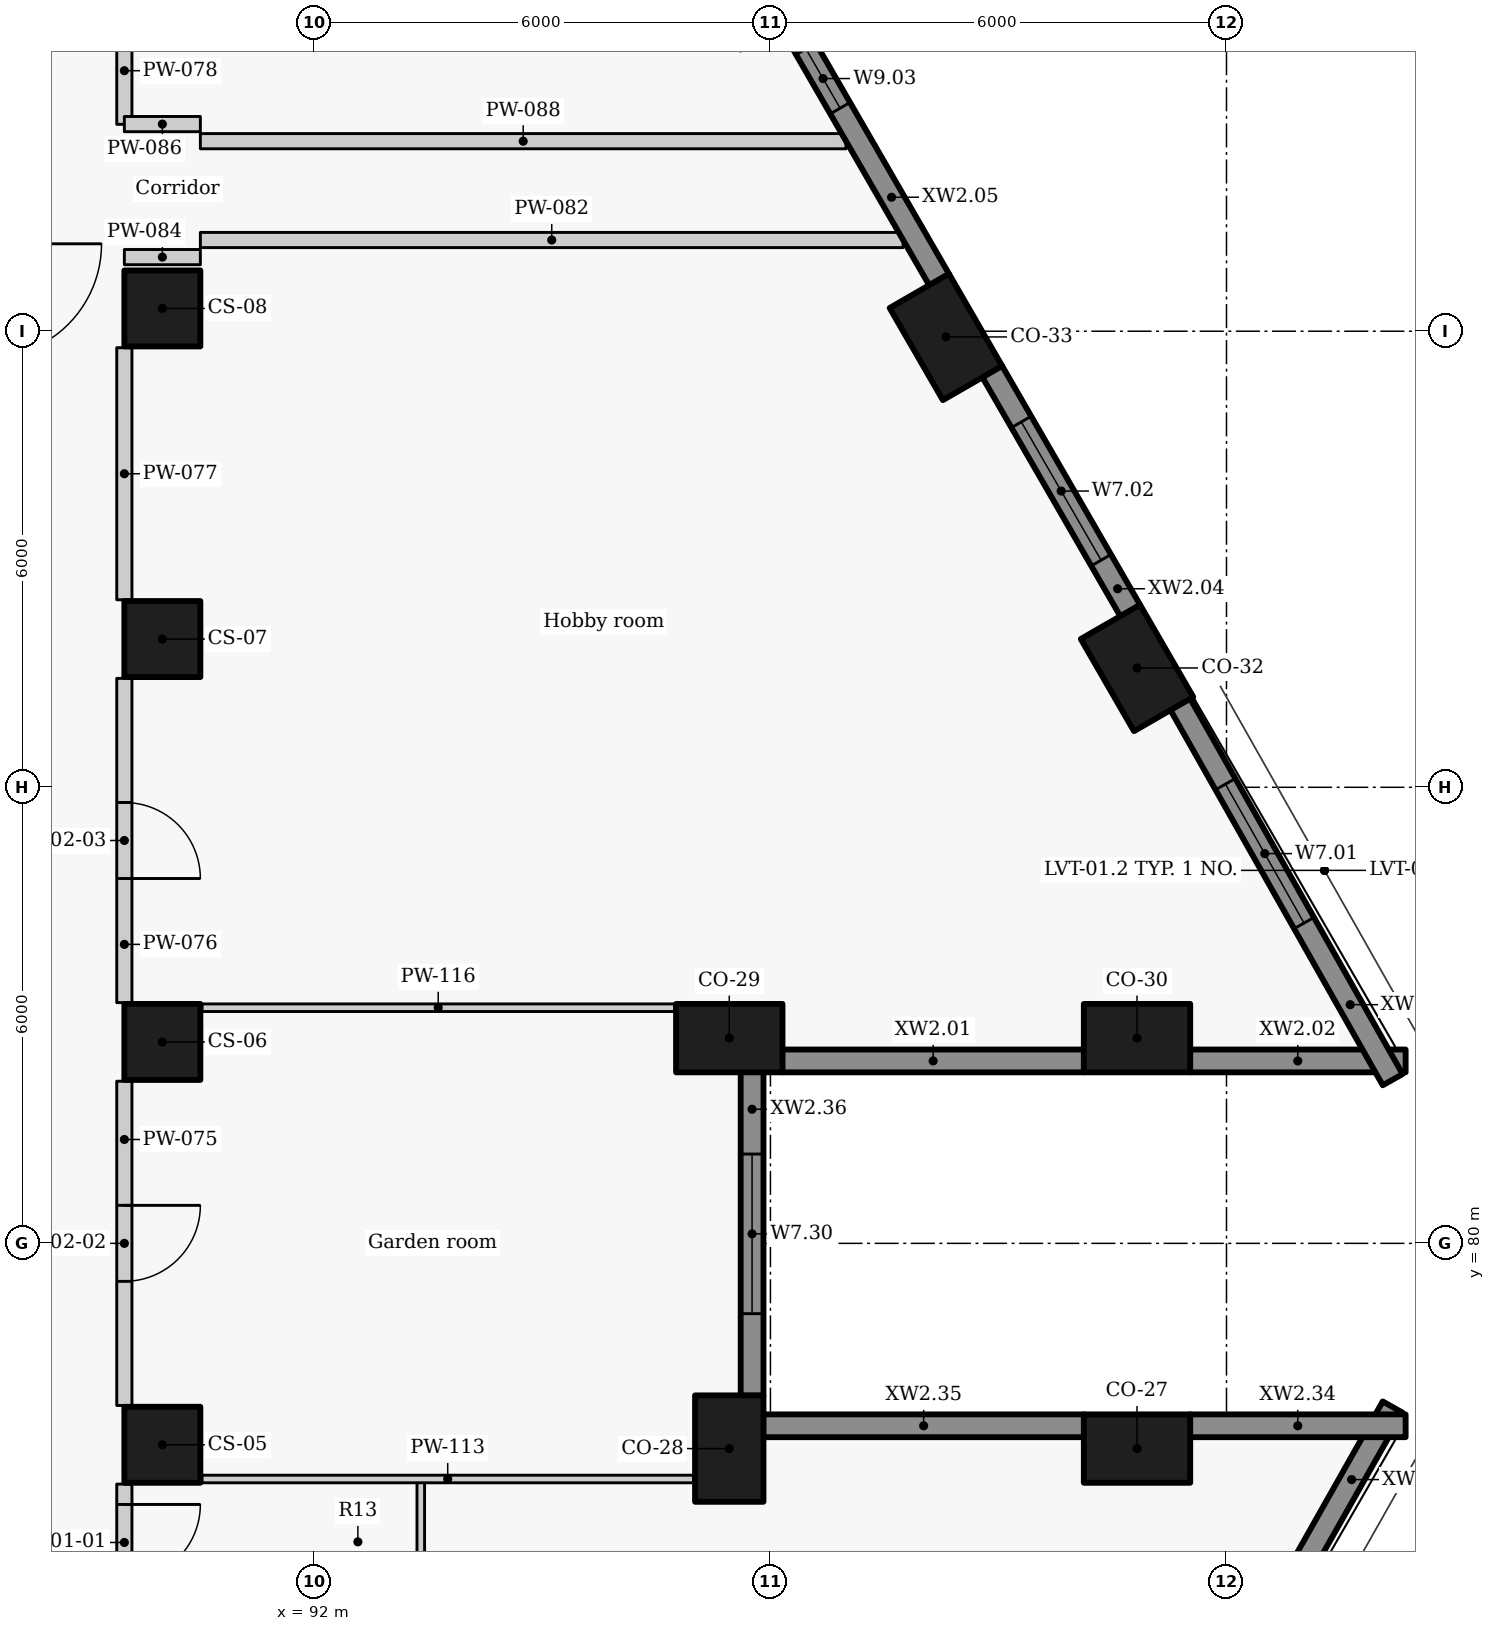
"""IFC4 building model, lengths in metres.
Left out: names, types, materials, properties, quantities, classifications, styles, units other than length and angle.
Written with IfcOpenShell. Run it as: python <this file> out.ifc"""

import sys

from ifc_helpers import new_model, si_unit, direction, frame, frame_2d, origin, origin_2d, place, context, subcontext, project, spatial, rectangle, extrude, element, fill, save


model = new_model("IFC4")
c1 = context("Model", 3, precision=1e-05, world=origin(), true_north=direction((0.0, 1.0)))
c2 = subcontext(c1, "Body", "Model", "MODEL_VIEW")
j1 = project(units=[si_unit("LENGTHUNIT", "METRE"), si_unit("PLANEANGLEUNIT", "RADIAN")], contexts=[c1])
p1 = place(None, origin())
s1 = spatial("IfcSite", under=j1, at=p1, CompositionType="ELEMENT")
p2 = place(p1, origin())
s2 = spatial("IfcBuilding", under=s1, at=p2, CompositionType="ELEMENT")
p3 = place(p2, frame((0.0, 0.0, 107.4)))
s3 = spatial("IfcBuildingStorey", under=s2, at=p3, CompositionType="ELEMENT", Elevation=107.4)
for number, where, z_axis, x_axis in (
    (1, (102.823, 77.3, 0.0), (0.0, 0.0, 1.0), (-1.0, 0.0, 0.0)),
    (2, (97.458, 77.3, 0.0), (0.0, 0.0, 1.0), (0.0, 1.0, 0.0)),
    (3, (97.458, 82.7, 0.0), (0.0, 0.0, 1.0), (1.0, 0.0, 0.0)),
    (4, (102.823, 82.7, 0.0), (0.0, 0.0, 1.0), (1.0, 0.0, 0.0)),
    (5, (102.823, 87.57, 0.0), (0.0, 0.0, 1.0), (-0.5, 0.866, 0.0)),
    (6, (100.308, 91.925, 0.0), (0.0, 0.0, 1.0), (-0.5, 0.866, 0.0)),
):
    element("IfcColumn", number, at=place(p3, frame(where, z_axis=z_axis, x_axis=x_axis)), inside=s3, PredefinedType="COLUMN", context=c2, shape_type="SweptSolid", body=[
        extrude(rectangle(XDim=1.4, YDim=0.9, at=origin_2d()), origin(), (0.0, 0.0, 1.0), 3.3),
    ])
for number, where, z_axis, x_axis in (
    (7, (90.0, 77.35, 0.0), (0.0, 0.0, 1.0), (0.0, 1.0, 0.0)),
    (8, (90.0, 82.65, 0.0), (0.0, 0.0, 1.0), (0.0, 1.0, 0.0)),
    (9, (90.0, 87.95, 0.0), (0.0, 0.0, 1.0), (0.0, 1.0, 0.0)),
    (10, (90.0, 92.3, 0.0), (0.0, 0.0, 1.0), (0.0, 1.0, 0.0)),
):
    element("IfcColumn", number, at=place(p3, frame(where, z_axis=z_axis, x_axis=x_axis)), inside=s3, PredefinedType="COLUMN", context=c2, shape_type="SweptSolid", body=[
        extrude(rectangle(XDim=1.0, YDim=1.0, at=origin_2d()), origin(), (0.0, 0.0, 1.0), 3.3),
    ])
p4 = place(p3, frame((98.154, 82.4, 0.0), z_axis=(0.0, 0.0, 1.0), x_axis=(1.0, 0.0, 0.0)))
e11 = element("IfcWall", 11, at=p4, inside=s3, PredefinedType="SOLIDWALL", context=c2, shape_type="SweptSolid", body=[
    extrude(rectangle(XDim=3.973, YDim=0.3, at=frame_2d((1.986, 0.0))), origin(), (0.0, 0.0, 1.0), 2.425),
])
p5 = place(p3, frame((103.519, 82.4, 0.0), z_axis=(0.0, 0.0, 1.0), x_axis=(1.0, 0.0, 0.0)))
e12 = element("IfcWall", 12, at=p5, inside=s3, PredefinedType="SOLIDWALL", context=c2, shape_type="SweptSolid", body=[
    extrude(rectangle(XDim=2.838, YDim=0.3, at=frame_2d((1.419, 0.0))), origin(), (0.0, 0.0, 1.0), 2.425),
])
p6 = place(p3, frame((106.186, 82.153, 0.0), z_axis=(0.0, 0.0, 1.0), x_axis=(-0.492456858874, 0.870336855561, 0.0)))
e13 = element("IfcWall", 13, at=p6, inside=s3, PredefinedType="SOLIDWALL", context=c2, shape_type="SweptSolid", body=[
    extrude(rectangle(XDim=5.677, YDim=0.3, at=frame_2d((2.838, 0.0))), origin(), (0.0, 0.0, 1.0), 2.425),
])
p7 = place(p6, frame((2.367, 0.0, 0.9)))
e14 = element("IfcOpeningElement", 14, at=p7, cuts=e13, PredefinedType="OPENING", context=c2, shape_type="SweptSolid", body=[
    extrude(rectangle(XDim=2.1, YDim=1.1, at=frame_2d((1.05, 0.55))), frame((0.0, 0.16, 0.0), z_axis=(0.0, -1.0, 0.0), x_axis=(1.0, 0.0, 0.0)), (0.0, 0.0, 1.0), 0.32),
])
p8 = place(p3, frame((102.735, 88.323, 0.0), z_axis=(0.0, 0.0, 1.0), x_axis=(-0.500009139881, 0.866020126807, 0.0)))
e15 = element("IfcWall", 15, at=p8, inside=s3, PredefinedType="SOLIDWALL", context=c2, shape_type="SweptSolid", body=[
    extrude(rectangle(XDim=3.637, YDim=0.3, at=frame_2d((1.818, 0.0))), origin(), (0.0, 0.0, 1.0), 2.425),
])
p9 = place(p8, frame((0.768, 0.0, 0.9)))
e16 = element("IfcOpeningElement", 16, at=p9, cuts=e15, PredefinedType="OPENING", context=c2, shape_type="SweptSolid", body=[
    extrude(rectangle(XDim=2.1, YDim=1.1, at=frame_2d((1.05, 0.55))), frame((0.0, 0.16, 0.0), z_axis=(0.0, -1.0, 0.0), x_axis=(1.0, 0.0, 0.0)), (0.0, 0.0, 1.0), 0.32),
])
p10 = place(p3, frame((100.22, 92.677, 0.0), z_axis=(0.0, 0.0, 1.0), x_axis=(-0.499957037901, 0.866050206543, 0.0)))
e17 = element("IfcWall", 17, at=p10, inside=s3, PredefinedType="SOLIDWALL", context=c2, shape_type="SweptSolid", body=[
    extrude(rectangle(XDim=3.934, YDim=0.3, at=frame_2d((1.967, 0.0))), origin(), (0.0, 0.0, 1.0), 2.425),
])
p11 = place(p10, frame((2.606, 0.0, 0.9)))
e18 = element("IfcOpeningElement", 18, at=p11, cuts=e17, PredefinedType="OPENING", context=c2, shape_type="SweptSolid", body=[
    extrude(rectangle(XDim=0.9, YDim=1.1, at=frame_2d((0.45, 0.55))), frame((0.0, 0.16, 0.0), z_axis=(0.0, -1.0, 0.0), x_axis=(1.0, 0.0, 0.0)), (0.0, 0.0, 1.0), 0.32),
])
p12 = place(p3, frame((103.391, 72.906, 0.0), z_axis=(0.0, 0.0, 1.0), x_axis=(0.492456858874, 0.870336855561, 0.0)))
e19 = element("IfcWall", 19, at=p12, inside=s3, PredefinedType="SOLIDWALL", context=c2, shape_type="SweptSolid", body=[
    extrude(rectangle(XDim=5.677, YDim=0.3, at=frame_2d((2.838, 0.0))), origin(), (0.0, 0.0, 1.0), 2.425),
])
p13 = place(p12, frame((1.883, 0.0, 0.9)))
e20 = element("IfcOpeningElement", 20, at=p13, cuts=e19, PredefinedType="OPENING", context=c2, shape_type="SweptSolid", body=[
    extrude(rectangle(XDim=1.5, YDim=1.1, at=frame_2d((0.75, 0.55))), frame((0.0, 0.16, 0.0), z_axis=(0.0, -1.0, 0.0), x_axis=(1.0, 0.0, 0.0)), (0.0, 0.0, 1.0), 0.32),
])
p14 = place(p3, frame((106.357, 77.6, 0.0), z_axis=(0.0, 0.0, 1.0), x_axis=(-1.0, 0.0, 0.0)))
e21 = element("IfcWall", 21, at=p14, inside=s3, PredefinedType="SOLIDWALL", context=c2, shape_type="SweptSolid", body=[
    extrude(rectangle(XDim=2.838, YDim=0.3, at=frame_2d((1.419, 0.0))), origin(), (0.0, 0.0, 1.0), 2.425),
])
p15 = place(p3, frame((102.127, 77.6, 0.0), z_axis=(0.0, 0.0, 1.0), x_axis=(-1.0, 0.0, 0.0)))
e22 = element("IfcWall", 22, at=p15, inside=s3, PredefinedType="SOLIDWALL", context=c2, shape_type="SweptSolid", body=[
    extrude(rectangle(XDim=4.223, YDim=0.3, at=frame_2d((2.111, 0.0))), origin(), (0.0, 0.0, 1.0), 2.425),
])
p16 = place(p3, frame((97.758, 77.996, 0.0), z_axis=(0.0, 0.0, 1.0), x_axis=(0.0, 1.0, 0.0)))
e23 = element("IfcWall", 23, at=p16, inside=s3, PredefinedType="SOLIDWALL", context=c2, shape_type="SweptSolid", body=[
    extrude(rectangle(XDim=4.258, YDim=0.3, at=frame_2d((2.129, 0.0))), origin(), (0.0, 0.0, 1.0), 2.425),
])
p17 = place(p16, frame((1.079, 0.0, 0.9)))
e24 = element("IfcOpeningElement", 24, at=p17, cuts=e23, PredefinedType="OPENING", context=c2, shape_type="SweptSolid", body=[
    extrude(rectangle(XDim=2.1, YDim=1.1, at=frame_2d((1.05, 0.55))), frame((0.0, 0.16, 0.0), z_axis=(0.0, -1.0, 0.0), x_axis=(1.0, 0.0, 0.0)), (0.0, 0.0, 1.0), 0.32),
])
p18 = place(p3, frame((89.5, 76.833, 0.0), z_axis=(0.0, 0.0, 1.0), x_axis=(0.0, -1.0, 0.0)))
e25 = element("IfcWall", 25, at=p18, inside=s3, PredefinedType="PARTITIONING", context=c2, shape_type="SweptSolid", body=[
    extrude(rectangle(XDim=4.266, YDim=0.2, at=frame_2d((2.133, 0.0))), origin(), (0.0, 0.0, 1.0), 3.025),
])
p19 = place(p18, frame((0.268, 0.0, 0.0)))
e26 = element("IfcOpeningElement", 26, at=p19, cuts=e25, PredefinedType="OPENING", context=c2, shape_type="SweptSolid", body=[
    extrude(rectangle(XDim=1.0, YDim=2.1, at=frame_2d((0.5, 1.05))), frame((0.0, 0.11, 0.0), z_axis=(0.0, -1.0, 0.0), x_axis=(1.0, 0.0, 0.0)), (0.0, 0.0, 1.0), 0.22),
])
p20 = place(p3, frame((89.5, 82.133, 0.0), z_axis=(0.0, 0.0, 1.0), x_axis=(0.0, -1.0, 0.0)))
e27 = element("IfcWall", 27, at=p20, inside=s3, PredefinedType="PARTITIONING", context=c2, shape_type="SweptSolid", body=[
    extrude(rectangle(XDim=4.266, YDim=0.2, at=frame_2d((2.133, 0.0))), origin(), (0.0, 0.0, 1.0), 3.025),
])
p21 = place(p20, frame((1.633, 0.0, 0.0)))
e28 = element("IfcOpeningElement", 28, at=p21, cuts=e27, PredefinedType="OPENING", context=c2, shape_type="SweptSolid", body=[
    extrude(rectangle(XDim=1.0, YDim=2.1, at=frame_2d((0.5, 1.05))), frame((0.0, 0.11, 0.0), z_axis=(0.0, -1.0, 0.0), x_axis=(1.0, 0.0, 0.0)), (0.0, 0.0, 1.0), 0.22),
])
p22 = place(p3, frame((89.5, 87.433, 0.0), z_axis=(0.0, 0.0, 1.0), x_axis=(0.0, -1.0, 0.0)))
e29 = element("IfcWall", 29, at=p22, inside=s3, PredefinedType="PARTITIONING", context=c2, shape_type="SweptSolid", body=[
    extrude(rectangle(XDim=4.266, YDim=0.2, at=frame_2d((2.133, 0.0))), origin(), (0.0, 0.0, 1.0), 3.025),
])
p23 = place(p22, frame((1.633, 0.0, 0.0)))
e30 = element("IfcOpeningElement", 30, at=p23, cuts=e29, PredefinedType="OPENING", context=c2, shape_type="SweptSolid", body=[
    extrude(rectangle(XDim=1.0, YDim=2.1, at=frame_2d((0.5, 1.05))), frame((0.0, 0.11, 0.0), z_axis=(0.0, -1.0, 0.0), x_axis=(1.0, 0.0, 0.0)), (0.0, 0.0, 1.0), 0.22),
])
p24 = place(p3, frame((89.5, 88.467, 0.0), z_axis=(0.0, 0.0, 1.0), x_axis=(0.0, 1.0, 0.0)))
e31 = element("IfcWall", 31, at=p24, inside=s3, PredefinedType="PARTITIONING", context=c2, shape_type="SweptSolid", body=[
    extrude(rectangle(XDim=3.316, YDim=0.2, at=frame_2d((1.658, 0.0))), origin(), (0.0, 0.0, 1.0), 3.025),
])
p25 = place(p3, frame((89.5, 94.722, 0.0), z_axis=(0.0, 0.0, 1.0), x_axis=(0.0, 1.0, 0.0)))
e32 = element("IfcWall", 32, at=p25, inside=s3, PredefinedType="PARTITIONING", context=c2, shape_type="SweptSolid", body=[
    extrude(rectangle(XDim=1.411, YDim=0.2, at=frame_2d((0.706, 0.0))), origin(), (0.0, 0.0, 1.0), 3.025),
])
p26 = place(p3, frame((90.5, 93.2, 0.0), z_axis=(0.0, 0.0, 1.0), x_axis=(1.0, 0.0, 0.0)))
e33 = element("IfcWall", 33, at=p26, inside=s3, PredefinedType="PARTITIONING", context=c2, shape_type="SweptSolid", body=[
    extrude(rectangle(XDim=9.245, YDim=0.2, at=frame_2d((4.623, 0.0))), origin(), (0.0, 0.0, 1.0), 2.405),
])
for number, where, z_axis, x_axis in (
    (34, (89.5, 92.975, 0.0), (0.0, 0.0, 1.0), (1.0, 0.0, 0.0)),
    (35, (89.5, 94.725, 0.0), (0.0, 0.0, 1.0), (1.0, 0.0, 0.0)),
):
    element("IfcWall", number, at=place(p3, frame(where, z_axis=z_axis, x_axis=x_axis)), inside=s3, PredefinedType="PARTITIONING", context=c2, shape_type="SweptSolid", body=[
        extrude(rectangle(XDim=1.0, YDim=0.2, at=frame_2d((0.5, 0.0))), origin(), (0.0, 0.0, 1.0), 2.505),
    ])
p27 = place(p3, frame((90.5, 94.5, 0.0), z_axis=(0.0, 0.0, 1.0), x_axis=(1.0, 0.0, 0.0)))
e36 = element("IfcWall", 36, at=p27, inside=s3, PredefinedType="PARTITIONING", context=c2, shape_type="SweptSolid", body=[
    extrude(rectangle(XDim=8.495, YDim=0.2, at=frame_2d((4.248, 0.0))), origin(), (0.0, 0.0, 1.0), 2.405),
])
p28 = place(p3, frame((93.4, 76.9, 0.0), z_axis=(0.0, 0.0, 1.0), x_axis=(0.0, -1.0, 0.0)))
e37 = element("IfcWall", 37, at=p28, inside=s3, PredefinedType="PARTITIONING", context=c2, shape_type="SweptSolid", body=[
    extrude(rectangle(XDim=11.15, YDim=0.1, at=frame_2d((5.575, 0.0))), origin(), (0.0, 0.0, 1.0), 3.025),
])
p29 = place(p28, frame((8.362, 0.0, 0.0)))
e38 = element("IfcOpeningElement", 38, at=p29, cuts=e37, PredefinedType="OPENING", context=c2, shape_type="SweptSolid", body=[
    extrude(rectangle(XDim=0.9, YDim=2.1, at=frame_2d((0.45, 1.05))), frame((0.0, 0.06, 0.0), z_axis=(0.0, -1.0, 0.0), x_axis=(1.0, 0.0, 0.0)), (0.0, 0.0, 1.0), 0.12),
])
p30 = place(p28, frame((4.406, 0.0, 0.0)))
e39 = element("IfcOpeningElement", 39, at=p30, cuts=e37, PredefinedType="OPENING", context=c2, shape_type="SweptSolid", body=[
    extrude(rectangle(XDim=0.9, YDim=2.1, at=frame_2d((0.45, 1.05))), frame((0.0, 0.06, 0.0), z_axis=(0.0, -1.0, 0.0), x_axis=(1.0, 0.0, 0.0)), (0.0, 0.0, 1.0), 0.12),
])
p31 = place(p28, frame((1.169, 0.0, 0.0)))
e40 = element("IfcOpeningElement", 40, at=p31, cuts=e37, PredefinedType="OPENING", context=c2, shape_type="SweptSolid", body=[
    extrude(rectangle(XDim=0.9, YDim=2.1, at=frame_2d((0.45, 1.05))), frame((0.0, 0.06, 0.0), z_axis=(0.0, -1.0, 0.0), x_axis=(1.0, 0.0, 0.0)), (0.0, 0.0, 1.0), 0.12),
])
p32 = place(p3, frame((90.52, 76.9, 0.0), z_axis=(0.0, 0.0, 1.0), x_axis=(1.0, 0.0, 0.0)))
e41 = element("IfcWall", 41, at=p32, inside=s3, PredefinedType="PARTITIONING", context=c2, shape_type="SweptSolid", body=[
    extrude(rectangle(XDim=6.468, YDim=0.1, at=frame_2d((3.234, 0.0))), origin(), (0.0, 0.0, 1.0), 3.025),
])
p33 = place(p3, frame((90.52, 83.1, 0.0), z_axis=(0.0, 0.0, 1.0), x_axis=(1.0, 0.0, 0.0)))
e42 = element("IfcWall", 42, at=p33, inside=s3, PredefinedType="PARTITIONING", context=c2, shape_type="SweptSolid", body=[
    extrude(rectangle(XDim=6.218, YDim=0.1, at=frame_2d((3.109, 0.0))), origin(), (0.0, 0.0, 1.0), 3.025),
])
p34 = place(p7, origin())
e43 = element("IfcWindow", 43, at=p34, inside=s3, PartitioningType="SINGLE_PANEL", PredefinedType="WINDOW", context=c2, shape_type="SweptSolid", body=[
    extrude(rectangle(XDim=2.1, YDim=1.1, at=frame_2d((1.05, 0.55))), frame((0.0, 0.03, 0.0), z_axis=(0.0, -1.0, 0.0), x_axis=(1.0, 0.0, 0.0)), (0.0, 0.0, 1.0), 0.06),
])
fill(e14, e43)
p35 = place(p9, origin())
e44 = element("IfcWindow", 44, at=p35, inside=s3, PartitioningType="SINGLE_PANEL", PredefinedType="WINDOW", context=c2, shape_type="SweptSolid", body=[
    extrude(rectangle(XDim=2.1, YDim=1.1, at=frame_2d((1.05, 0.55))), frame((0.0, 0.03, 0.0), z_axis=(0.0, -1.0, 0.0), x_axis=(1.0, 0.0, 0.0)), (0.0, 0.0, 1.0), 0.06),
])
fill(e16, e44)
p36 = place(p11, origin())
e45 = element("IfcWindow", 45, at=p36, inside=s3, PartitioningType="SINGLE_PANEL", PredefinedType="WINDOW", context=c2, shape_type="SweptSolid", body=[
    extrude(rectangle(XDim=0.9, YDim=1.1, at=frame_2d((0.45, 0.55))), frame((0.0, 0.03, 0.0), z_axis=(0.0, -1.0, 0.0), x_axis=(1.0, 0.0, 0.0)), (0.0, 0.0, 1.0), 0.06),
])
fill(e18, e45)
p37 = place(p17, origin())
e46 = element("IfcWindow", 46, at=p37, inside=s3, PartitioningType="SINGLE_PANEL", PredefinedType="WINDOW", context=c2, shape_type="SweptSolid", body=[
    extrude(rectangle(XDim=2.1, YDim=1.1, at=frame_2d((1.05, 0.55))), frame((0.0, 0.03, 0.0), z_axis=(0.0, -1.0, 0.0), x_axis=(1.0, 0.0, 0.0)), (0.0, 0.0, 1.0), 0.06),
])
fill(e24, e46)
p38 = place(p19, origin())
e47 = element("IfcDoor", 47, at=p38, inside=s3, OperationType="SINGLE_SWING_LEFT", PredefinedType="DOOR", context=c2, shape_type="SweptSolid", body=[
    extrude(rectangle(XDim=1.0, YDim=2.1, at=frame_2d((0.5, 1.05))), frame((0.0, 0.025, 0.0), z_axis=(0.0, -1.0, 0.0), x_axis=(1.0, 0.0, 0.0)), (0.0, 0.0, 1.0), 0.05),
])
fill(e26, e47)
p39 = place(p21, origin())
e48 = element("IfcDoor", 48, at=p39, inside=s3, OperationType="SINGLE_SWING_LEFT", PredefinedType="DOOR", context=c2, shape_type="SweptSolid", body=[
    extrude(rectangle(XDim=1.0, YDim=2.1, at=frame_2d((0.5, 1.05))), frame((0.0, 0.025, 0.0), z_axis=(0.0, -1.0, 0.0), x_axis=(1.0, 0.0, 0.0)), (0.0, 0.0, 1.0), 0.05),
])
fill(e28, e48)
p40 = place(p23, origin())
e49 = element("IfcDoor", 49, at=p40, inside=s3, OperationType="SINGLE_SWING_RIGHT", PredefinedType="DOOR", context=c2, shape_type="SweptSolid", body=[
    extrude(rectangle(XDim=1.0, YDim=2.1, at=frame_2d((0.5, 1.05))), frame((0.0, 0.025, 0.0), z_axis=(0.0, -1.0, 0.0), x_axis=(1.0, 0.0, 0.0)), (0.0, 0.0, 1.0), 0.05),
])
fill(e30, e49)
save(model, sys.argv[1])
